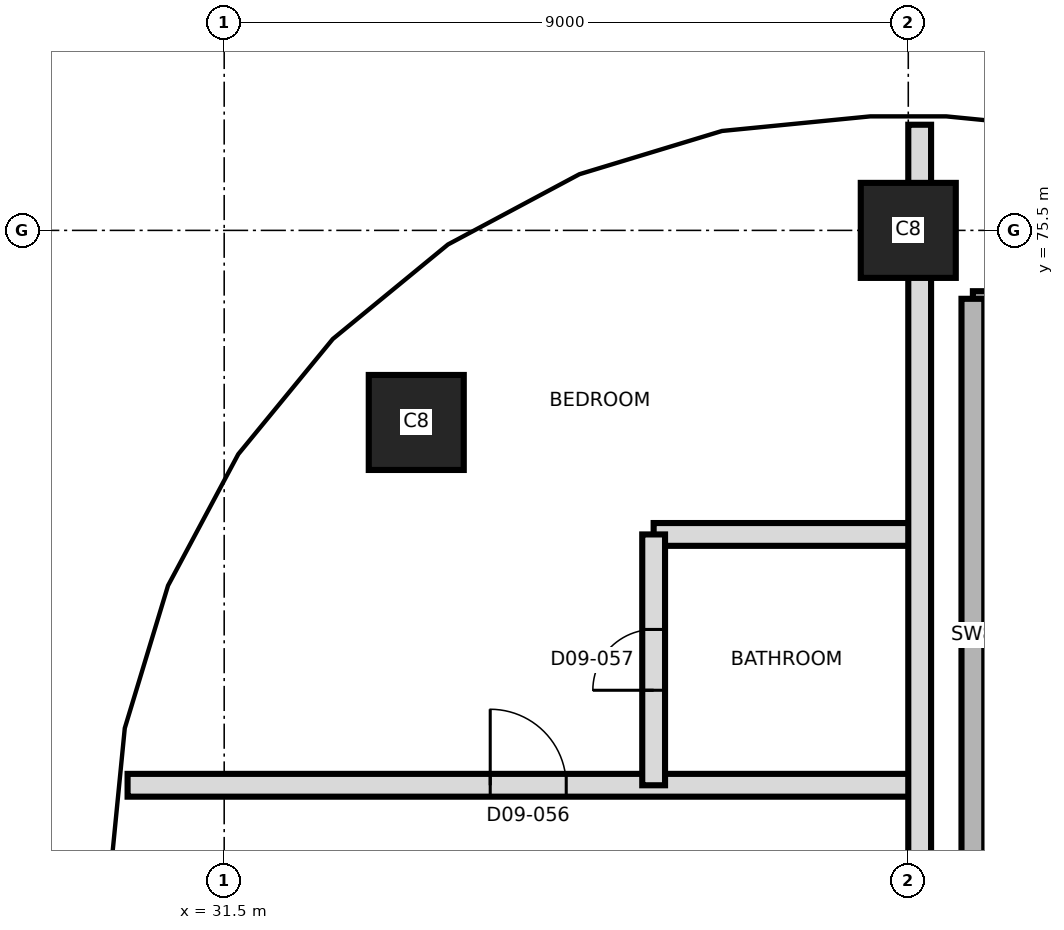
"""IFC4 building model, lengths in metres.
Left out: names, types, materials, properties, quantities, classifications, styles, units other than length and angle.
Written with IfcOpenShell. Run it as: python <this file> out.ifc"""

import sys

from ifc_helpers import new_model, si_unit, direction, frame, frame_2d, origin, origin_2d, place, context, subcontext, project, spatial, rectangle, extrude, element, fill, save


model = new_model("IFC4")
c1 = context("Model", 3, precision=1e-05, world=origin(), true_north=direction((0.0, 1.0)))
c2 = subcontext(c1, "Body", "Model", "MODEL_VIEW")
j1 = project(units=[si_unit("LENGTHUNIT", "METRE"), si_unit("PLANEANGLEUNIT", "RADIAN")], contexts=[c1])
p1 = place(None, origin())
s1 = spatial("IfcSite", under=j1, at=p1, CompositionType="ELEMENT")
p2 = place(p1, origin())
s2 = spatial("IfcBuilding", under=s1, at=p2, CompositionType="ELEMENT")
p3 = place(p2, frame((0.0, 0.0, 109.3)))
s3 = spatial("IfcBuildingStorey", under=s2, at=p3, CompositionType="ELEMENT", Elevation=109.3)
for number, where, z_axis, x_axis in (
    (1, (34.027, 72.973, 0.0), (0.0, 0.0, 1.0), (1.0, 0.0, 0.0)),
    (2, (40.5, 75.5, 0.0), (0.0, 0.0, 1.0), (1.0, 0.0, 0.0)),
):
    element("IfcColumn", number, at=place(p3, frame(where, z_axis=z_axis, x_axis=x_axis)), inside=s3, PredefinedType="COLUMN", context=c2, shape_type="SweptSolid", body=[
        extrude(rectangle(XDim=1.25, YDim=1.25, at=origin_2d()), origin(), (0.0, 0.0, 1.0), 3.7),
    ])
p4 = place(p3, frame((30.229, 68.2, 0.0), z_axis=(0.0, 0.0, 1.0), x_axis=(1.0, 0.0, 0.0)))
e3 = element("IfcWall", 3, at=p4, inside=s3, PredefinedType="PARTITIONING", context=c2, shape_type="SweptSolid", body=[
    extrude(rectangle(XDim=10.421, YDim=0.3, at=frame_2d((5.21, 0.0))), origin(), (0.0, 0.0, 1.0), 3.4),
])
p5 = place(p4, frame((4.771, 0.0, 0.0)))
e4 = element("IfcOpeningElement", 4, at=p5, cuts=e3, PredefinedType="OPENING", context=c2, shape_type="SweptSolid", body=[
    extrude(rectangle(XDim=1.0, YDim=2.1, at=frame_2d((0.5, 1.05))), frame((0.0, 0.16, 0.0), z_axis=(0.0, -1.0, 0.0), x_axis=(1.0, 0.0, 0.0)), (0.0, 0.0, 1.0), 0.32),
])
p6 = place(p3, frame((37.15, 71.5, 0.0), z_axis=(0.0, 0.0, 1.0), x_axis=(1.0, 0.0, 0.0)))
e5 = element("IfcWall", 5, at=p6, inside=s3, PredefinedType="PARTITIONING", context=c2, shape_type="SweptSolid", body=[
    extrude(rectangle(XDim=3.5, YDim=0.3, at=frame_2d((1.75, 0.0))), origin(), (0.0, 0.0, 1.0), 3.4),
])
p7 = place(p3, frame((41.35, 74.55, 0.0), z_axis=(0.0, 0.0, 1.0), x_axis=(1.0, 0.0, 0.0)))
e6 = element("IfcWall", 6, at=p7, inside=s3, PredefinedType="SHEAR", context=c2, shape_type="SweptSolid", body=[
    extrude(rectangle(XDim=3.0, YDim=0.3, at=frame_2d((1.5, 0.0))), origin(), (0.0, 0.0, 1.0), 3.4),
])
p8 = place(p3, frame((37.15, 68.2, 0.0), z_axis=(0.0, 0.0, 1.0), x_axis=(0.0, 1.0, 0.0)))
e7 = element("IfcWall", 7, at=p8, inside=s3, PredefinedType="PARTITIONING", context=c2, shape_type="SweptSolid", body=[
    extrude(rectangle(XDim=3.3, YDim=0.3, at=frame_2d((1.65, 0.0))), origin(), (0.0, 0.0, 1.0), 3.4),
])
p9 = place(p8, frame((1.25, 0.0, 0.0)))
e8 = element("IfcOpeningElement", 8, at=p9, cuts=e7, PredefinedType="OPENING", context=c2, shape_type="SweptSolid", body=[
    extrude(rectangle(XDim=0.8, YDim=2.1, at=frame_2d((0.4, 1.05))), frame((0.0, 0.16, 0.0), z_axis=(0.0, -1.0, 0.0), x_axis=(1.0, 0.0, 0.0)), (0.0, 0.0, 1.0), 0.32),
])
p10 = place(p3, frame((40.65, 39.8, 0.0), z_axis=(0.0, 0.0, 1.0), x_axis=(0.0, 1.0, 0.0)))
e9 = element("IfcWall", 9, at=p10, inside=s3, PredefinedType="PARTITIONING", context=c2, shape_type="SweptSolid", body=[
    extrude(rectangle(XDim=37.09, YDim=0.3, at=frame_2d((18.545, 0.0))), origin(), (0.0, 0.0, 1.0), 3.4),
])
p11 = place(p10, frame((0.835, 0.0, 0.0)))
e10 = element("IfcOpeningElement", 10, at=p11, cuts=e9, PredefinedType="OPENING", context=c2, shape_type="SweptSolid", body=[
    extrude(rectangle(XDim=1.2, YDim=2.1, at=frame_2d((0.6, 1.05))), frame((0.0, 0.16, 0.0), z_axis=(0.0, -1.0, 0.0), x_axis=(1.0, 0.0, 0.0)), (0.0, 0.0, 1.0), 0.32),
])
p12 = place(p10, frame((4.085, 0.0, 0.0)))
e11 = element("IfcOpeningElement", 11, at=p12, cuts=e9, PredefinedType="OPENING", context=c2, shape_type="SweptSolid", body=[
    extrude(rectangle(XDim=1.0, YDim=2.1, at=frame_2d((0.5, 1.05))), frame((0.0, 0.16, 0.0), z_axis=(0.0, -1.0, 0.0), x_axis=(1.0, 0.0, 0.0)), (0.0, 0.0, 1.0), 0.32),
])
p13 = place(p10, frame((11.62, 0.0, 0.0)))
e12 = element("IfcOpeningElement", 12, at=p13, cuts=e9, PredefinedType="OPENING", context=c2, shape_type="SweptSolid", body=[
    extrude(rectangle(XDim=1.0, YDim=2.4, at=frame_2d((0.5, 1.2))), frame((0.0, 0.16, 0.0), z_axis=(0.0, -1.0, 0.0), x_axis=(1.0, 0.0, 0.0)), (0.0, 0.0, 1.0), 0.32),
])
p14 = place(p10, frame((13.27, 0.0, 0.0)))
e13 = element("IfcOpeningElement", 13, at=p14, cuts=e9, PredefinedType="OPENING", context=c2, shape_type="SweptSolid", body=[
    extrude(rectangle(XDim=1.0, YDim=2.4, at=frame_2d((0.5, 1.2))), frame((0.0, 0.16, 0.0), z_axis=(0.0, -1.0, 0.0), x_axis=(1.0, 0.0, 0.0)), (0.0, 0.0, 1.0), 0.32),
])
p15 = place(p10, frame((21.2, 0.0, 0.0)))
e14 = element("IfcOpeningElement", 14, at=p15, cuts=e9, PredefinedType="OPENING", context=c2, shape_type="SweptSolid", body=[
    extrude(rectangle(XDim=1.0, YDim=2.4, at=frame_2d((0.5, 1.2))), frame((0.0, 0.16, 0.0), z_axis=(0.0, -1.0, 0.0), x_axis=(1.0, 0.0, 0.0)), (0.0, 0.0, 1.0), 0.32),
])
p16 = place(p3, frame((41.35, 65.75, 0.0), z_axis=(0.0, 0.0, 1.0), x_axis=(0.0, 1.0, 0.0)))
e15 = element("IfcWall", 15, at=p16, inside=s3, PredefinedType="SHEAR", context=c2, shape_type="SweptSolid", body=[
    extrude(rectangle(XDim=8.85, YDim=0.3, at=frame_2d((4.425, 0.0))), origin(), (0.0, 0.0, 1.0), 3.4),
])
p17 = place(p5, origin())
e16 = element("IfcDoor", 16, at=p17, inside=s3, OperationType="SINGLE_SWING_RIGHT", PredefinedType="DOOR", context=c2, shape_type="SweptSolid", body=[
    extrude(rectangle(XDim=1.0, YDim=2.1, at=frame_2d((0.5, 1.05))), frame((0.0, 0.025, 0.0), z_axis=(0.0, -1.0, 0.0), x_axis=(1.0, 0.0, 0.0)), (0.0, 0.0, 1.0), 0.05),
])
fill(e4, e16)
p18 = place(p9, origin())
e17 = element("IfcDoor", 17, at=p18, inside=s3, OperationType="SINGLE_SWING_LEFT", PredefinedType="DOOR", context=c2, shape_type="SweptSolid", body=[
    extrude(rectangle(XDim=0.8, YDim=2.1, at=frame_2d((0.4, 1.05))), frame((0.0, 0.025, 0.0), z_axis=(0.0, -1.0, 0.0), x_axis=(1.0, 0.0, 0.0)), (0.0, 0.0, 1.0), 0.05),
])
fill(e8, e17)
save(model, sys.argv[1])
